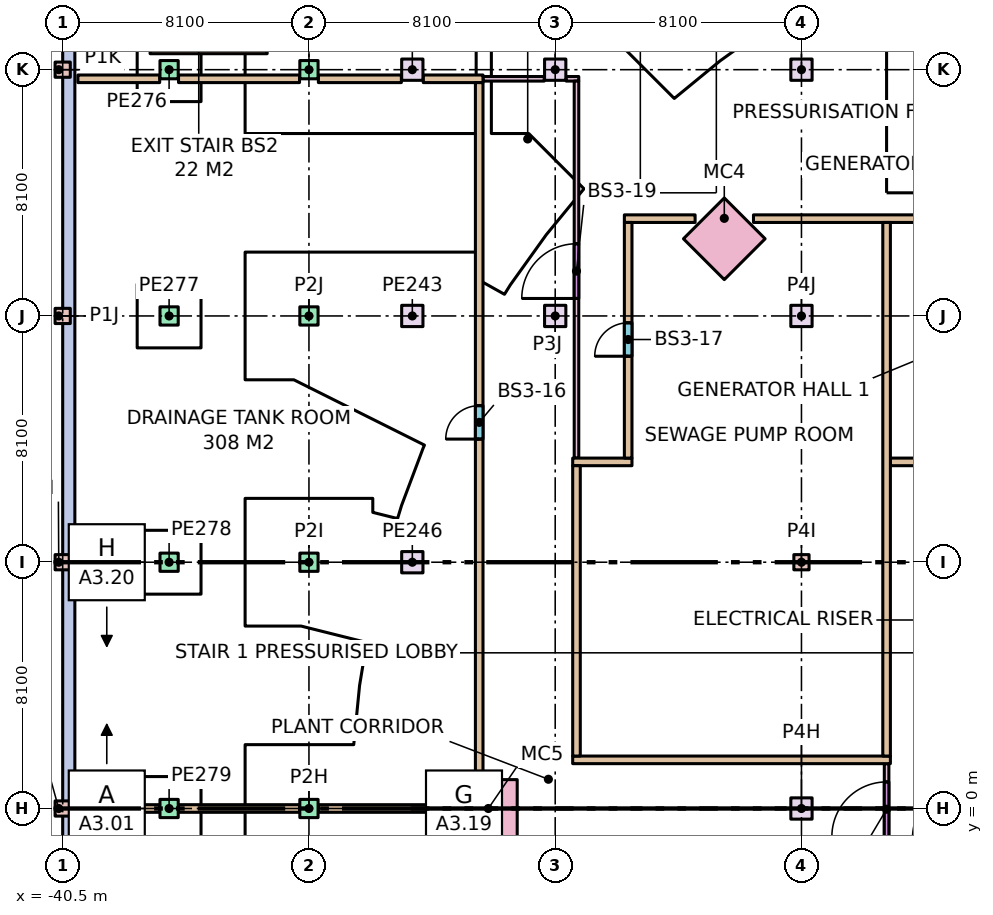
"""IFC4 building model, lengths in metres.
Left out: names, types, materials, properties, quantities, classifications, styles, units other than length and angle.
Written with IfcOpenShell. Run it as: python <this file> out.ifc"""

import sys

from ifc_helpers import new_model, si_unit, direction, frame, frame_2d, origin, origin_2d, place, context, subcontext, project, spatial, rectangle, extrude, element, fill, save


model = new_model("IFC4")
c1 = context("Model", 3, precision=1e-05, world=origin(), true_north=direction((0.0, 1.0)))
c2 = subcontext(c1, "Body", "Model", "MODEL_VIEW")
j1 = project(units=[si_unit("LENGTHUNIT", "METRE"), si_unit("PLANEANGLEUNIT", "RADIAN")], contexts=[c1])
p1 = place(None, origin())
s1 = spatial("IfcSite", under=j1, at=p1, CompositionType="ELEMENT")
p2 = place(p1, origin())
s2 = spatial("IfcBuilding", under=s1, at=p2, CompositionType="ELEMENT")
p3 = place(p2, frame((0.0, 0.0, -10.8)))
s3 = spatial("IfcBuildingStorey", under=s2, at=p3, CompositionType="ELEMENT", Elevation=-10.8)
p4 = place(p3, frame((-40.3, -56.3, 0.0), z_axis=(0.0, 0.0, 1.0), x_axis=(0.0, 1.0, 0.0)))
e1 = element("IfcWall", 1, at=p4, inside=s3, PredefinedType="SOLIDWALL", context=c2, shape_type="SweptSolid", body=[
    extrude(rectangle(XDim=112.6, YDim=0.4, at=frame_2d((56.3, 0.0))), origin(), (0.0, 0.0, 1.0), 3.6),
])
for number, where, z_axis, x_axis in (
    (2, (-40.5, 0.0, 0.0), (0.0, 0.0, 1.0), (1.0, 0.0, 0.0)),
    (3, (-40.5, 8.1, 0.0), (0.0, 0.0, 1.0), (1.0, 0.0, 0.0)),
    (4, (-40.5, 16.2, 0.0), (0.0, 0.0, 1.0), (1.0, 0.0, 0.0)),
    (5, (-40.5, 24.3, 0.0), (0.0, 0.0, 1.0), (1.0, 0.0, 0.0)),
):
    element("IfcColumn", number, at=place(p3, frame(where, z_axis=z_axis, x_axis=x_axis)), inside=s3, PredefinedType="COLUMN", context=c2, shape_type="SweptSolid", body=[
        extrude(rectangle(XDim=0.5, YDim=0.5, at=origin_2d()), origin(), (0.0, 0.0, 1.0), 3.6),
    ])
for number, where, z_axis, x_axis in (
    (6, (-32.4, 0.0, 0.0), (0.0, 0.0, 1.0), (1.0, 0.0, 0.0)),
    (7, (-32.4, 8.1, 0.0), (0.0, 0.0, 1.0), (1.0, 0.0, 0.0)),
    (8, (-32.4, 16.2, 0.0), (0.0, 0.0, 1.0), (1.0, 0.0, 0.0)),
    (9, (-32.4, 24.3, 0.0), (0.0, 0.0, 1.0), (1.0, 0.0, 0.0)),
):
    element("IfcColumn", number, at=place(p3, frame(where, z_axis=z_axis, x_axis=x_axis)), inside=s3, PredefinedType="COLUMN", context=c2, shape_type="SweptSolid", body=[
        extrude(rectangle(XDim=0.6, YDim=0.6, at=origin_2d()), origin(), (0.0, 0.0, 1.0), 3.6),
    ])
for number, where, z_axis, x_axis in (
    (10, (-24.3, 16.2, 0.0), (0.0, 0.0, 1.0), (1.0, 0.0, 0.0)),
    (11, (-24.3, 24.3, 0.0), (0.0, 0.0, 1.0), (1.0, 0.0, 0.0)),
    (12, (-16.2, 0.0, 0.0), (0.0, 0.0, 1.0), (1.0, 0.0, 0.0)),
):
    element("IfcColumn", number, at=place(p3, frame(where, z_axis=z_axis, x_axis=x_axis)), inside=s3, PredefinedType="COLUMN", context=c2, shape_type="SweptSolid", body=[
        extrude(rectangle(XDim=0.7, YDim=0.7, at=origin_2d()), origin(), (0.0, 0.0, 1.0), 3.6),
    ])
p5 = place(p3, frame((-16.2, 8.1, 0.0), z_axis=(0.0, 0.0, 1.0), x_axis=(1.0, 0.0, 0.0)))
e13 = element("IfcColumn", 13, at=p5, inside=s3, PredefinedType="COLUMN", context=c2, shape_type="SweptSolid", body=[
    extrude(rectangle(XDim=0.5, YDim=0.5, at=origin_2d()), origin(), (0.0, 0.0, 1.0), 3.6),
])
for number, where, z_axis, x_axis in (
    (14, (-16.2, 16.2, 0.0), (0.0, 0.0, 1.0), (1.0, 0.0, 0.0)),
    (15, (-16.2, 24.3, 0.0), (0.0, 0.0, 1.0), (1.0, 0.0, 0.0)),
    (16, (-29.0, 24.3, 0.0), (0.0, 0.0, 1.0), (1.0, 0.0, 0.0)),
    (17, (-29.0, 16.2, 0.0), (0.0, 0.0, 1.0), (1.0, 0.0, 0.0)),
    (18, (-29.0, 8.1, 0.0), (0.0, 0.0, 1.0), (1.0, 0.0, 0.0)),
):
    element("IfcColumn", number, at=place(p3, frame(where, z_axis=z_axis, x_axis=x_axis)), inside=s3, PredefinedType="COLUMN", context=c2, shape_type="SweptSolid", body=[
        extrude(rectangle(XDim=0.7, YDim=0.7, at=origin_2d()), origin(), (0.0, 0.0, 1.0), 3.6),
    ])
for number, where, z_axis, x_axis in (
    (19, (-37.0, 24.3, 0.0), (0.0, 0.0, 1.0), (1.0, 0.0, 0.0)),
    (20, (-37.0, 16.2, 0.0), (0.0, 0.0, 1.0), (1.0, 0.0, 0.0)),
    (21, (-37.0, 8.1, 0.0), (0.0, 0.0, 1.0), (1.0, 0.0, 0.0)),
    (22, (-37.0, 0.0, 0.0), (0.0, 0.0, 1.0), (1.0, 0.0, 0.0)),
):
    element("IfcColumn", number, at=place(p3, frame(where, z_axis=z_axis, x_axis=x_axis)), inside=s3, PredefinedType="COLUMN", context=c2, shape_type="SweptSolid", body=[
        extrude(rectangle(XDim=0.6, YDim=0.6, at=origin_2d()), origin(), (0.0, 0.0, 1.0), 3.6),
    ])
for number, where, z_axis, x_axis in (
    (23, (-18.738, 18.738, 0.0), (0.0, 0.0, 1.0), (-0.707, -0.707, 0.0)),
    (24, (-26.5, 0.0, 0.0), (0.0, 0.0, 1.0), (0.0, -1.0, 0.0)),
):
    element("IfcColumn", number, at=place(p3, frame(where, z_axis=z_axis, x_axis=x_axis)), inside=s3, PredefinedType="COLUMN", context=c2, shape_type="SweptSolid", body=[
        extrude(rectangle(XDim=1.9, YDim=1.9, at=origin_2d()), origin(), (0.0, 0.0, 1.0), 3.6),
    ])
p6 = place(p3, frame((-37.625, 24.95, 0.0), z_axis=(0.0, 0.0, 1.0), x_axis=(1.0, 0.0, 0.0)))
e25 = element("IfcWall", 25, at=p6, inside=s3, PredefinedType="STANDARD", context=c2, shape_type="SweptSolid", body=[
    extrude(rectangle(XDim=3.85, YDim=0.25, at=frame_2d((1.925, 0.0))), origin(), (0.0, 0.0, 1.0), 3.28),
])
p7 = place(p3, frame((-13.275, 11.4, 0.0), z_axis=(0.0, 0.0, 1.0), x_axis=(1.0, 0.0, 0.0)))
e26 = element("IfcWall", 26, at=p7, inside=s3, PredefinedType="PARTITIONING", context=c2, shape_type="SweptSolid", body=[
    extrude(rectangle(XDim=34.55, YDim=0.25, at=frame_2d((17.275, 0.0))), origin(), (0.0, 0.0, 1.0), 3.28),
])
p8 = place(p3, frame((-26.675, 24.0, 0.0), z_axis=(0.0, 0.0, 1.0), x_axis=(1.0, 0.0, 0.0)))
e27 = element("IfcWall", 27, at=p8, inside=s3, PredefinedType="PARTITIONING", context=c2, shape_type="SweptSolid", body=[
    extrude(rectangle(XDim=2.015, YDim=0.15, at=frame_2d((1.008, 0.0))), origin(), (0.0, 0.0, 1.0), 3.28),
])
p9 = place(p3, frame((-23.94, 24.0, 0.0), z_axis=(0.0, 0.0, 1.0), x_axis=(1.0, 0.0, 0.0)))
e28 = element("IfcWall", 28, at=p9, inside=s3, PredefinedType="PARTITIONING", context=c2, shape_type="SweptSolid", body=[
    extrude(rectangle(XDim=0.415, YDim=0.15, at=frame_2d((0.208, 0.0))), origin(), (0.0, 0.0, 1.0), 3.28),
])
p10 = place(p3, frame((-23.6, 11.525, 0.0), z_axis=(0.0, 0.0, 1.0), x_axis=(0.0, 1.0, 0.0)))
e29 = element("IfcWall", 29, at=p10, inside=s3, PredefinedType="PARTITIONING", context=c2, shape_type="SweptSolid", body=[
    extrude(rectangle(XDim=12.4, YDim=0.15, at=frame_2d((6.2, 0.0))), origin(), (0.0, 0.0, 1.0), 3.28),
])
p11 = place(p10, frame((5.25, 0.0, 0.0)))
e30 = element("IfcOpeningElement", 30, at=p11, cuts=e29, PredefinedType="OPENING", context=c2, shape_type="SweptSolid", body=[
    extrude(rectangle(XDim=1.8, YDim=2.4, at=frame_2d((0.9, 1.2))), frame((0.0, 0.085, 0.0), z_axis=(0.0, -1.0, 0.0), x_axis=(1.0, 0.0, 0.0)), (0.0, 0.0, 1.0), 0.17),
])
p12 = place(p3, frame((-40.0, 24.0, 0.0), z_axis=(0.0, 0.0, 1.0), x_axis=(1.0, 0.0, 0.0)))
e31 = element("IfcWall", 31, at=p12, inside=s3, PredefinedType="PARTITIONING", context=c2, shape_type="SweptSolid", body=[
    extrude(rectangle(XDim=2.69, YDim=0.25, at=frame_2d((1.345, 0.0))), origin(), (0.0, 0.0, 1.0), 3.28),
])
p13 = place(p3, frame((-36.69, 24.0, 0.0), z_axis=(0.0, 0.0, 1.0), x_axis=(1.0, 0.0, 0.0)))
e32 = element("IfcWall", 32, at=p13, inside=s3, PredefinedType="PARTITIONING", context=c2, shape_type="SweptSolid", body=[
    extrude(rectangle(XDim=3.98, YDim=0.25, at=frame_2d((1.99, 0.0))), origin(), (0.0, 0.0, 1.0), 3.28),
])
p14 = place(p3, frame((-32.09, 24.0, 0.0), z_axis=(0.0, 0.0, 1.0), x_axis=(1.0, 0.0, 0.0)))
e33 = element("IfcWall", 33, at=p14, inside=s3, PredefinedType="PARTITIONING", context=c2, shape_type="SweptSolid", body=[
    extrude(rectangle(XDim=2.73, YDim=0.25, at=frame_2d((1.365, 0.0))), origin(), (0.0, 0.0, 1.0), 3.28),
])
p15 = place(p3, frame((-28.64, 24.0, 0.0), z_axis=(0.0, 0.0, 1.0), x_axis=(1.0, 0.0, 0.0)))
e34 = element("IfcWall", 34, at=p15, inside=s3, PredefinedType="PARTITIONING", context=c2, shape_type="SweptSolid", body=[
    extrude(rectangle(XDim=1.965, YDim=0.25, at=frame_2d((0.982, 0.0))), origin(), (0.0, 0.0, 1.0), 3.28),
])
p16 = place(p3, frame((-23.725, 11.4, 0.0), z_axis=(0.0, 0.0, 1.0), x_axis=(1.0, 0.0, 0.0)))
e35 = element("IfcWall", 35, at=p16, inside=s3, PredefinedType="PARTITIONING", context=c2, shape_type="SweptSolid", body=[
    extrude(rectangle(XDim=1.95, YDim=0.25, at=frame_2d((0.975, 0.0))), origin(), (0.0, 0.0, 1.0), 3.28),
])
p17 = place(p3, frame((-22.025, 19.4, 0.0), z_axis=(0.0, 0.0, 1.0), x_axis=(1.0, 0.0, 0.0)))
e36 = element("IfcWall", 36, at=p17, inside=s3, PredefinedType="PARTITIONING", context=c2, shape_type="SweptSolid", body=[
    extrude(rectangle(XDim=2.327, YDim=0.25, at=frame_2d((1.163, 0.0))), origin(), (0.0, 0.0, 1.0), 3.28),
])
p18 = place(p3, frame((-17.778, 19.4, 0.0), z_axis=(0.0, 0.0, 1.0), x_axis=(1.0, 0.0, 0.0)))
e37 = element("IfcWall", 37, at=p18, inside=s3, PredefinedType="PARTITIONING", context=c2, shape_type="SweptSolid", body=[
    extrude(rectangle(XDim=35.557, YDim=0.25, at=frame_2d((17.778, 0.0))), origin(), (0.0, 0.0, 1.0), 3.28),
])
p19 = place(p18, frame((7.753, 0.0, 0.0)))
e38 = element("IfcOpeningElement", 38, at=p19, cuts=e37, PredefinedType="OPENING", context=c2, shape_type="SweptSolid", body=[
    extrude(rectangle(XDim=1.1, YDim=2.1, at=frame_2d((0.55, 1.05))), frame((0.0, 0.135, 0.0), z_axis=(0.0, -1.0, 0.0), x_axis=(1.0, 0.0, 0.0)), (0.0, 0.0, 1.0), 0.27),
])
p20 = place(p18, frame((15.41, 0.0, 0.0)))
e39 = element("IfcOpeningElement", 39, at=p20, cuts=e37, PredefinedType="OPENING", context=c2, shape_type="SweptSolid", body=[
    extrude(rectangle(XDim=1.1, YDim=2.1, at=frame_2d((0.55, 1.05))), frame((0.0, 0.135, 0.0), z_axis=(0.0, -1.0, 0.0), x_axis=(1.0, 0.0, 0.0)), (0.0, 0.0, 1.0), 0.27),
])
p21 = place(p18, frame((22.167, 0.0, 0.0)))
e40 = element("IfcOpeningElement", 40, at=p21, cuts=e37, PredefinedType="OPENING", context=c2, shape_type="SweptSolid", body=[
    extrude(rectangle(XDim=1.0, YDim=2.1, at=frame_2d((0.5, 1.05))), frame((0.0, 0.135, 0.0), z_axis=(0.0, -1.0, 0.0), x_axis=(1.0, 0.0, 0.0)), (0.0, 0.0, 1.0), 0.27),
])
p22 = place(p18, frame((30.01, 0.0, 0.0)))
e41 = element("IfcOpeningElement", 41, at=p22, cuts=e37, PredefinedType="OPENING", context=c2, shape_type="SweptSolid", body=[
    extrude(rectangle(XDim=1.1, YDim=2.1, at=frame_2d((0.55, 1.05))), frame((0.0, 0.135, 0.0), z_axis=(0.0, -1.0, 0.0), x_axis=(1.0, 0.0, 0.0)), (0.0, 0.0, 1.0), 0.27),
])
p23 = place(p3, frame((-21.9, 11.525, 0.0), z_axis=(0.0, 0.0, 1.0), x_axis=(0.0, 1.0, 0.0)))
e42 = element("IfcWall", 42, at=p23, inside=s3, PredefinedType="PARTITIONING", context=c2, shape_type="SweptSolid", body=[
    extrude(rectangle(XDim=7.75, YDim=0.25, at=frame_2d((3.875, 0.0))), origin(), (0.0, 0.0, 1.0), 3.28),
])
p24 = place(p23, frame((3.35, 0.0, 0.0)))
e43 = element("IfcOpeningElement", 43, at=p24, cuts=e42, PredefinedType="OPENING", context=c2, shape_type="SweptSolid", body=[
    extrude(rectangle(XDim=1.1, YDim=2.1, at=frame_2d((0.55, 1.05))), frame((0.0, 0.135, 0.0), z_axis=(0.0, -1.0, 0.0), x_axis=(1.0, 0.0, 0.0)), (0.0, 0.0, 1.0), 0.27),
])
p25 = place(p3, frame((-13.4, -1.475, 0.0), z_axis=(0.0, 0.0, 1.0), x_axis=(0.0, 1.0, 0.0)))
e44 = element("IfcWall", 44, at=p25, inside=s3, PredefinedType="PARTITIONING", context=c2, shape_type="SweptSolid", body=[
    extrude(rectangle(XDim=2.95, YDim=0.15, at=frame_2d((1.475, 0.0))), origin(), (0.0, 0.0, 1.0), 3.28),
])
p26 = place(p25, frame((0.55, 0.0, 0.0)))
e45 = element("IfcOpeningElement", 45, at=p26, cuts=e44, PredefinedType="OPENING", context=c2, shape_type="SweptSolid", body=[
    extrude(rectangle(XDim=1.8, YDim=2.4, at=frame_2d((0.9, 1.2))), frame((0.0, 0.085, 0.0), z_axis=(0.0, -1.0, 0.0), x_axis=(1.0, 0.0, 0.0)), (0.0, 0.0, 1.0), 0.17),
])
p27 = place(p3, frame((-26.8, 0.96, 0.0), z_axis=(0.0, 0.0, 1.0), x_axis=(0.0, 1.0, 0.0)))
e46 = element("IfcWall", 46, at=p27, inside=s3, PredefinedType="PARTITIONING", context=c2, shape_type="SweptSolid", body=[
    extrude(rectangle(XDim=22.915, YDim=0.25, at=frame_2d((11.458, 0.0))), origin(), (0.0, 0.0, 1.0), 3.28),
])
p28 = place(p27, frame((11.19, 0.0, 0.0)))
e47 = element("IfcOpeningElement", 47, at=p28, cuts=e46, PredefinedType="OPENING", context=c2, shape_type="SweptSolid", body=[
    extrude(rectangle(XDim=1.1, YDim=2.1, at=frame_2d((0.55, 1.05))), frame((0.0, 0.135, 0.0), z_axis=(0.0, -1.0, 0.0), x_axis=(1.0, 0.0, 0.0)), (0.0, 0.0, 1.0), 0.27),
])
p29 = place(p3, frame((-23.725, 1.6, 0.0), z_axis=(0.0, 0.0, 1.0), x_axis=(1.0, 0.0, 0.0)))
e48 = element("IfcWall", 48, at=p29, inside=s3, PredefinedType="PARTITIONING", context=c2, shape_type="SweptSolid", body=[
    extrude(rectangle(XDim=10.45, YDim=0.25, at=frame_2d((5.225, 0.0))), origin(), (0.0, 0.0, 1.0), 3.28),
])
p30 = place(p3, frame((-23.6, 1.725, 0.0), z_axis=(0.0, 0.0, 1.0), x_axis=(0.0, 1.0, 0.0)))
e49 = element("IfcWall", 49, at=p30, inside=s3, PredefinedType="PARTITIONING", context=c2, shape_type="SweptSolid", body=[
    extrude(rectangle(XDim=9.55, YDim=0.25, at=frame_2d((4.775, 0.0))), origin(), (0.0, 0.0, 1.0), 3.28),
])
p31 = place(p3, frame((-13.4, 1.725, 0.0), z_axis=(0.0, 0.0, 1.0), x_axis=(0.0, 1.0, 0.0)))
e50 = element("IfcWall", 50, at=p31, inside=s3, PredefinedType="PARTITIONING", context=c2, shape_type="SweptSolid", body=[
    extrude(rectangle(XDim=17.55, YDim=0.25, at=frame_2d((8.775, 0.0))), origin(), (0.0, 0.0, 1.0), 3.28),
])
p32 = place(p3, frame((-40.0, 0.0, 0.0), z_axis=(0.0, 0.0, 1.0), x_axis=(1.0, 0.0, 0.0)))
e51 = element("IfcWall", 51, at=p32, inside=s3, PredefinedType="PARTITIONING", context=c2, shape_type="SweptSolid", body=[
    extrude(rectangle(XDim=2.69, YDim=0.25, at=frame_2d((1.345, 0.0))), origin(), (0.0, 0.0, 1.0), 3.28),
])
p33 = place(p3, frame((-36.69, 0.0, 0.0), z_axis=(0.0, 0.0, 1.0), x_axis=(1.0, 0.0, 0.0)))
e52 = element("IfcWall", 52, at=p33, inside=s3, PredefinedType="PARTITIONING", context=c2, shape_type="SweptSolid", body=[
    extrude(rectangle(XDim=3.98, YDim=0.25, at=frame_2d((1.99, 0.0))), origin(), (0.0, 0.0, 1.0), 3.28),
])
p34 = place(p3, frame((-32.09, 0.0, 0.0), z_axis=(0.0, 0.0, 1.0), x_axis=(1.0, 0.0, 0.0)))
e53 = element("IfcWall", 53, at=p34, inside=s3, PredefinedType="PARTITIONING", context=c2, shape_type="SweptSolid", body=[
    extrude(rectangle(XDim=4.63, YDim=0.25, at=frame_2d((2.315, 0.0))), origin(), (0.0, 0.0, 1.0), 3.28),
])
p35 = place(p28, origin())
e54 = element("IfcDoor", 54, at=p35, inside=s3, OperationType="SINGLE_SWING_LEFT", PredefinedType="DOOR", context=c2, shape_type="SweptSolid", body=[
    extrude(rectangle(XDim=1.1, YDim=2.1, at=frame_2d((0.55, 1.05))), frame((0.0, 0.025, 0.0), z_axis=(0.0, -1.0, 0.0), x_axis=(1.0, 0.0, 0.0)), (0.0, 0.0, 1.0), 0.05),
])
fill(e47, e54)
p36 = place(p24, origin())
e55 = element("IfcDoor", 55, at=p36, inside=s3, OperationType="SINGLE_SWING_LEFT", PredefinedType="DOOR", context=c2, shape_type="SweptSolid", body=[
    extrude(rectangle(XDim=1.1, YDim=2.1, at=frame_2d((0.55, 1.05))), frame((0.0, 0.025, 0.0), z_axis=(0.0, -1.0, 0.0), x_axis=(1.0, 0.0, 0.0)), (0.0, 0.0, 1.0), 0.05),
])
fill(e43, e55)
p37 = place(p11, origin())
e56 = element("IfcDoor", 56, at=p37, inside=s3, OperationType="SINGLE_SWING_LEFT", PredefinedType="DOOR", context=c2, shape_type="SweptSolid", body=[
    extrude(rectangle(XDim=1.8, YDim=2.4, at=frame_2d((0.9, 1.2))), frame((0.0, 0.025, 0.0), z_axis=(0.0, -1.0, 0.0), x_axis=(1.0, 0.0, 0.0)), (0.0, 0.0, 1.0), 0.05),
])
fill(e30, e56)
p38 = place(p26, origin())
e57 = element("IfcDoor", 57, at=p38, inside=s3, OperationType="SINGLE_SWING_LEFT", PredefinedType="DOOR", context=c2, shape_type="SweptSolid", body=[
    extrude(rectangle(XDim=1.8, YDim=2.4, at=frame_2d((0.9, 1.2))), frame((0.0, 0.025, 0.0), z_axis=(0.0, -1.0, 0.0), x_axis=(1.0, 0.0, 0.0)), (0.0, 0.0, 1.0), 0.05),
])
fill(e45, e57)
save(model, sys.argv[1])
